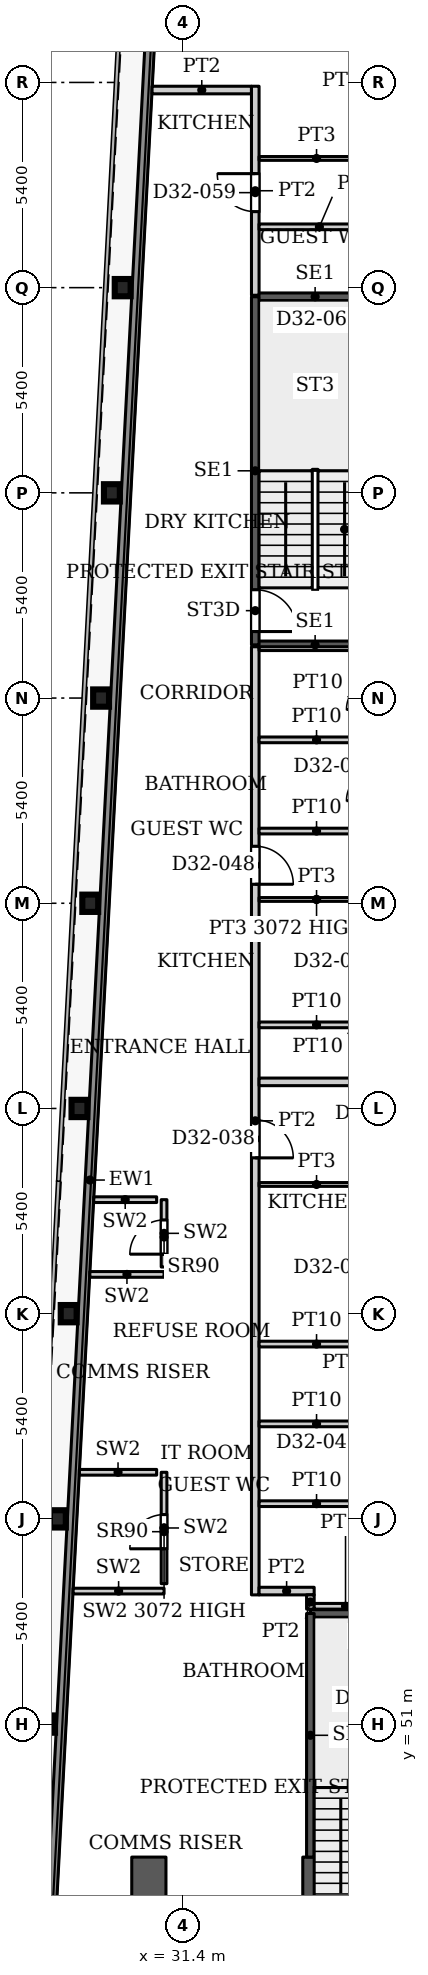
"""IFC4 building model, lengths in metres.
Left out: names, types, materials, properties, quantities, classifications, styles, units other than length and angle.
Written with IfcOpenShell. Run it as: python <this file> out.ifc"""

import sys

from ifc_helpers import new_model, si_unit, direction, frame, frame_2d, origin, origin_2d, place, context, subcontext, project, spatial, rectangle, i_section, extrude, source, transform, mapped, element, fill, save


model = new_model("IFC4")
c1 = context("Model", 3, precision=1e-05, world=origin(), true_north=direction((0.0, 1.0)))
c2 = subcontext(c1, "Body", "Model", "MODEL_VIEW")
j1 = project(units=[si_unit("LENGTHUNIT", "METRE"), si_unit("PLANEANGLEUNIT", "RADIAN")], contexts=[c1])
p1 = place(None, origin())
s1 = spatial("IfcSite", under=j1, at=p1, CompositionType="ELEMENT")
p2 = place(p1, origin())
s2 = spatial("IfcBuilding", under=s1, at=p2, CompositionType="ELEMENT")
p3 = place(p2, frame((0.0, 0.0, 137.0)))
s3 = spatial("IfcBuildingStorey", under=s2, at=p3, CompositionType="ELEMENT", Elevation=137.0)
for number, where, z_axis, x_axis in (
    (1, (27.822, 51.0, 0.0), (0.0, 0.0, 1.0), (1.0, 0.0, 0.0)),
    (2, (28.106, 56.4, 0.0), (0.0, 0.0, 1.0), (1.0, 0.0, 0.0)),
    (3, (28.39, 61.8, 0.0), (0.0, 0.0, 1.0), (1.0, 0.0, 0.0)),
    (4, (28.674, 67.2, 0.0), (0.0, 0.0, 1.0), (1.0, 0.0, 0.0)),
    (5, (28.958, 72.6, 0.0), (0.0, 0.0, 1.0), (1.0, 0.0, 0.0)),
    (6, (29.243, 78.0, 0.0), (0.0, 0.0, 1.0), (1.0, 0.0, 0.0)),
    (7, (29.527, 83.4, 0.0), (0.0, 0.0, 1.0), (1.0, 0.0, 0.0)),
    (8, (29.811, 88.8, 0.0), (0.0, 0.0, 1.0), (1.0, 0.0, 0.0)),
):
    element("IfcColumn", number, at=place(p3, frame(where, z_axis=z_axis, x_axis=x_axis)), inside=s3, PredefinedType="COLUMN", context=c2, shape_type="SweptSolid", body=[
        extrude(i_section(OverallWidth=0.418, OverallDepth=0.455, WebThickness=0.042, FlangeThickness=0.068, FilletRadius=0.014, at=origin_2d()), origin(), (0.0, 0.0, 1.0), 3.9),
    ])
p4 = place(p3, frame((34.75, 29.05, 0.0), z_axis=(0.0, 0.0, 1.0), x_axis=(0.0, 1.0, 0.0)))
e9 = element("IfcWall", 9, at=p4, inside=s3, PredefinedType="SHEAR", context=c2, shape_type="SweptSolid", body=[
    extrude(rectangle(XDim=18.45, YDim=0.4, at=frame_2d((9.225, 0.0))), origin(), (0.0, 0.0, 1.0), 3.9),
])
p5 = place(p4, frame((8.025, 0.0, 0.0)))
e10 = element("IfcOpeningElement", 10, at=p5, cuts=e9, PredefinedType="OPENING", context=c2, shape_type="SweptSolid", body=[
    extrude(rectangle(XDim=1.1, YDim=2.2, at=frame_2d((0.55, 1.1))), frame((0.0, 0.21, 0.0), z_axis=(0.0, -1.0, 0.0), x_axis=(1.0, 0.0, 0.0)), (0.0, 0.0, 1.0), 0.42),
])
p6 = place(p4, frame((10.875, 0.0, 0.0)))
e11 = element("IfcOpeningElement", 11, at=p6, cuts=e9, PredefinedType="OPENING", context=c2, shape_type="SweptSolid", body=[
    extrude(rectangle(XDim=1.1, YDim=2.2, at=frame_2d((0.55, 1.1))), frame((0.0, 0.21, 0.0), z_axis=(0.0, -1.0, 0.0), x_axis=(1.0, 0.0, 0.0)), (0.0, 0.0, 1.0), 0.42),
])
p7 = place(p4, frame((13.725, 0.0, 0.0)))
e12 = element("IfcOpeningElement", 12, at=p7, cuts=e9, PredefinedType="OPENING", context=c2, shape_type="SweptSolid", body=[
    extrude(rectangle(XDim=1.1, YDim=2.2, at=frame_2d((0.55, 1.1))), frame((0.0, 0.21, 0.0), z_axis=(0.0, -1.0, 0.0), x_axis=(1.0, 0.0, 0.0)), (0.0, 0.0, 1.0), 0.42),
])
p8 = place(p4, frame((15.95, 0.0, 0.0)))
e13 = element("IfcOpeningElement", 13, at=p8, cuts=e9, PredefinedType="OPENING", context=c2, shape_type="SweptSolid", body=[
    extrude(rectangle(XDim=1.1, YDim=2.2, at=frame_2d((0.55, 1.1))), frame((0.0, 0.21, 0.0), z_axis=(0.0, -1.0, 0.0), x_axis=(1.0, 0.0, 0.0)), (0.0, 0.0, 1.0), 0.42),
])
p9 = place(p3, frame((30.5, 29.05, 0.0), z_axis=(0.0, 0.0, 1.0), x_axis=(0.0, 1.0, 0.0)))
e14 = element("IfcWall", 14, at=p9, inside=s3, PredefinedType="SHEAR", context=c2, shape_type="SweptSolid", body=[
    extrude(rectangle(XDim=18.45, YDim=0.9, at=frame_2d((9.225, 0.0))), origin(), (0.0, 0.0, 1.0), 3.9),
])
p10 = place(p9, frame((1.5, 0.0, 0.0)))
e15 = element("IfcOpeningElement", 15, at=p10, cuts=e14, PredefinedType="OPENING", context=c2, shape_type="SweptSolid", body=[
    extrude(rectangle(XDim=0.9, YDim=2.2, at=frame_2d((0.45, 1.1))), frame((0.0, 0.46, 0.0), z_axis=(0.0, -1.0, 0.0), x_axis=(1.0, 0.0, 0.0)), (0.0, 0.0, 1.0), 0.92),
])
p11 = place(p9, frame((7.406, 0.0, 0.0)))
e16 = element("IfcOpeningElement", 16, at=p11, cuts=e14, PredefinedType="OPENING", context=c2, shape_type="SweptSolid", body=[
    extrude(rectangle(XDim=0.9, YDim=2.2, at=frame_2d((0.45, 1.1))), frame((0.0, 0.46, 0.0), z_axis=(0.0, -1.0, 0.0), x_axis=(1.0, 0.0, 0.0)), (0.0, 0.0, 1.0), 0.92),
])
p12 = place(p9, frame((11.688, 0.0, 0.0)))
e17 = element("IfcOpeningElement", 17, at=p12, cuts=e14, PredefinedType="OPENING", context=c2, shape_type="SweptSolid", body=[
    extrude(rectangle(XDim=0.9, YDim=2.2, at=frame_2d((0.45, 1.1))), frame((0.0, 0.46, 0.0), z_axis=(0.0, -1.0, 0.0), x_axis=(1.0, 0.0, 0.0)), (0.0, 0.0, 1.0), 0.92),
])
p13 = place(p3, frame((27.195, 31.969, 0.0), z_axis=(0.0, 0.0, 1.0), x_axis=(0.052554995867, 0.998618031286, 0.0)))
e18 = element("IfcWall", 18, at=p13, inside=s3, PredefinedType="SOLIDWALL", context=c2, shape_type="SweptSolid", body=[
    extrude(rectangle(XDim=66.787, YDim=0.25, at=frame_2d((33.394, 0.0))), origin(), (0.0, 0.0, 1.0), 3.75),
])
p14 = place(p3, frame((34.75, 53.91, 0.0), z_axis=(0.0, 0.0, 1.0), x_axis=(1.0, 0.0, 0.0)))
e19 = element("IfcWall", 19, at=p14, inside=s3, PredefinedType="SHEAR", context=c2, shape_type="SweptSolid", body=[
    extrude(rectangle(XDim=3.15, YDim=0.2, at=frame_2d((1.575, 0.0))), origin(), (0.0, 0.0, 1.0), 3.9),
])
p15 = place(p3, frame((34.75, 47.5, 0.0), z_axis=(0.0, 0.0, 1.0), x_axis=(0.0, 1.0, 0.0)))
e20 = element("IfcWall", 20, at=p15, inside=s3, PredefinedType="SHEAR", context=c2, shape_type="SweptSolid", body=[
    extrude(rectangle(XDim=6.41, YDim=0.2, at=frame_2d((3.205, 0.0))), origin(), (0.0, 0.0, 1.0), 3.9),
])
for number, where, z_axis, x_axis in (
    (21, (33.3, 79.4, 0.0), (0.0, 0.0, 1.0), (1.0, 0.0, 0.0)),
    (22, (33.3, 88.56, 0.0), (0.0, 0.0, 1.0), (1.0, 0.0, 0.0)),
):
    element("IfcWall", number, at=place(p3, frame(where, z_axis=z_axis, x_axis=x_axis)), inside=s3, PredefinedType="SHEAR", context=c2, shape_type="SweptSolid", body=[
        extrude(rectangle(XDim=3.15, YDim=0.2, at=frame_2d((1.575, 0.0))), origin(), (0.0, 0.0, 1.0), 3.9),
    ])
p16 = place(p3, frame((33.3, 79.4, 0.0), z_axis=(0.0, 0.0, 1.0), x_axis=(0.0, 1.0, 0.0)))
e23 = element("IfcWall", 23, at=p16, inside=s3, PredefinedType="SHEAR", context=c2, shape_type="SweptSolid", body=[
    extrude(rectangle(XDim=9.16, YDim=0.2, at=frame_2d((4.58, 0.0))), origin(), (0.0, 0.0, 1.0), 3.9),
])
p17 = place(p16, frame((0.35, 0.0, 0.0)))
e24 = element("IfcOpeningElement", 24, at=p17, cuts=e23, PredefinedType="OPENING", context=c2, shape_type="SweptSolid", body=[
    extrude(rectangle(XDim=1.1, YDim=2.2, at=frame_2d((0.55, 1.1))), frame((0.0, 0.11, 0.0), z_axis=(0.0, -1.0, 0.0), x_axis=(1.0, 0.0, 0.0)), (0.0, 0.0, 1.0), 0.22),
])
p18 = place(p3, frame((28.508, 54.5, 0.0), z_axis=(0.0, 0.0, 1.0), x_axis=(1.0, 0.0, 0.0)))
e25 = element("IfcWall", 25, at=p18, inside=s3, PredefinedType="PARTITIONING", context=c2, shape_type="SweptSolid", body=[
    extrude(rectangle(XDim=2.392, YDim=0.15, at=frame_2d((1.196, 0.0))), origin(), (0.0, 0.0, 1.0), 3.9),
])
p19 = place(p3, frame((30.9, 54.695, 0.0), z_axis=(0.0, 0.0, 1.0), x_axis=(0.0, 1.0, 0.0)))
e26 = element("IfcWall", 26, at=p19, inside=s3, PredefinedType="PARTITIONING", context=c2, shape_type="SweptSolid", body=[
    extrude(rectangle(XDim=2.931, YDim=0.15, at=frame_2d((1.465, 0.0))), origin(), (0.0, 0.0, 1.0), 3.072),
])
p20 = place(p19, frame((0.918, 0.0, 0.0)))
e27 = element("IfcOpeningElement", 27, at=p20, cuts=e26, PredefinedType="OPENING", context=c2, shape_type="SweptSolid", body=[
    extrude(rectangle(XDim=0.9, YDim=2.2, at=frame_2d((0.45, 1.1))), frame((0.0, 0.085, 0.0), z_axis=(0.0, -1.0, 0.0), x_axis=(1.0, 0.0, 0.0)), (0.0, 0.0, 1.0), 0.17),
])
p21 = place(p3, frame((28.673, 57.626, 0.0), z_axis=(0.0, 0.0, 1.0), x_axis=(1.0, 0.0, 0.0)))
e28 = element("IfcWall", 28, at=p21, inside=s3, PredefinedType="PARTITIONING", context=c2, shape_type="SweptSolid", body=[
    extrude(rectangle(XDim=2.032, YDim=0.15, at=frame_2d((1.016, 0.0))), origin(), (0.0, 0.0, 1.0), 3.9),
])
p22 = place(p3, frame((28.947, 62.833, 0.0), z_axis=(0.0, 0.0, 1.0), x_axis=(1.0, 0.0, 0.0)))
e29 = element("IfcWall", 29, at=p22, inside=s3, PredefinedType="PARTITIONING", context=c2, shape_type="SweptSolid", body=[
    extrude(rectangle(XDim=1.953, YDim=0.15, at=frame_2d((0.977, 0.0))), origin(), (0.0, 0.0, 1.0), 3.9),
])
p23 = place(p3, frame((30.9, 63.028, 0.0), z_axis=(0.0, 0.0, 1.0), x_axis=(0.0, 1.0, 0.0)))
e30 = element("IfcWall", 30, at=p23, inside=s3, PredefinedType="PARTITIONING", context=c2, shape_type="SweptSolid", body=[
    extrude(rectangle(XDim=1.772, YDim=0.15, at=frame_2d((0.886, 0.0))), origin(), (0.0, 0.0, 1.0), 3.9),
])
p24 = place(p23, frame((0.338, 0.0, 0.0)))
e31 = element("IfcOpeningElement", 31, at=p24, cuts=e30, PredefinedType="OPENING", context=c2, shape_type="SweptSolid", body=[
    extrude(rectangle(XDim=0.9, YDim=2.2, at=frame_2d((0.45, 1.1))), frame((0.0, 0.085, 0.0), z_axis=(0.0, -1.0, 0.0), x_axis=(1.0, 0.0, 0.0)), (0.0, 0.0, 1.0), 0.17),
])
p25 = place(p3, frame((29.05, 64.8, 0.0), z_axis=(0.0, 0.0, 1.0), x_axis=(1.0, 0.0, 0.0)))
e32 = element("IfcWall", 32, at=p25, inside=s3, PredefinedType="PARTITIONING", context=c2, shape_type="SweptSolid", body=[
    extrude(rectangle(XDim=1.655, YDim=0.15, at=frame_2d((0.828, 0.0))), origin(), (0.0, 0.0, 1.0), 3.9),
])
p26 = place(p3, frame((30.585, 94.0, 0.0), z_axis=(0.0, 0.0, 1.0), x_axis=(1.0, 0.0, 0.0)))
e33 = element("IfcWall", 33, at=p26, inside=s3, PredefinedType="PARTITIONING", context=c2, shape_type="SweptSolid", body=[
    extrude(rectangle(XDim=2.615, YDim=0.2, at=frame_2d((1.308, 0.0))), origin(), (0.0, 0.0, 1.0), 3.6),
])
p27 = place(p3, frame((33.3, 54.4, 0.0), z_axis=(0.0, 0.0, 1.0), x_axis=(0.0, 1.0, 0.0)))
e34 = element("IfcWall", 34, at=p27, inside=s3, PredefinedType="PARTITIONING", context=c2, shape_type="SweptSolid", body=[
    extrude(rectangle(XDim=24.95, YDim=0.2, at=frame_2d((12.475, 0.0))), origin(), (0.0, 0.0, 1.0), 3.6),
])
p28 = place(p27, frame((11.5, 0.0, 0.0)))
e35 = element("IfcOpeningElement", 35, at=p28, cuts=e34, PredefinedType="OPENING", context=c2, shape_type="SweptSolid", body=[
    extrude(rectangle(XDim=1.0, YDim=2.1, at=frame_2d((0.5, 1.05))), frame((0.0, 0.11, 0.0), z_axis=(0.0, -1.0, 0.0), x_axis=(1.0, 0.0, 0.0)), (0.0, 0.0, 1.0), 0.22),
])
p29 = place(p27, frame((18.7, 0.0, 0.0)))
e36 = element("IfcOpeningElement", 36, at=p29, cuts=e34, PredefinedType="OPENING", context=c2, shape_type="SweptSolid", body=[
    extrude(rectangle(XDim=1.0, YDim=2.1, at=frame_2d((0.5, 1.05))), frame((0.0, 0.11, 0.0), z_axis=(0.0, -1.0, 0.0), x_axis=(1.0, 0.0, 0.0)), (0.0, 0.0, 1.0), 0.22),
])
p30 = place(p3, frame((33.3, 88.6, 0.0), z_axis=(0.0, 0.0, 1.0), x_axis=(0.0, 1.0, 0.0)))
e37 = element("IfcWall", 37, at=p30, inside=s3, PredefinedType="PARTITIONING", context=c2, shape_type="SweptSolid", body=[
    extrude(rectangle(XDim=5.5, YDim=0.2, at=frame_2d((2.75, 0.0))), origin(), (0.0, 0.0, 1.0), 3.6),
])
p31 = place(p30, frame((2.2, 0.0, 0.0)))
e38 = element("IfcOpeningElement", 38, at=p31, cuts=e37, PredefinedType="OPENING", context=c2, shape_type="SweptSolid", body=[
    extrude(rectangle(XDim=1.0, YDim=2.1, at=frame_2d((0.5, 1.05))), frame((0.0, 0.11, 0.0), z_axis=(0.0, -1.0, 0.0), x_axis=(1.0, 0.0, 0.0)), (0.0, 0.0, 1.0), 0.22),
])
p32 = place(p3, frame((33.4, 54.5, 0.0), z_axis=(0.0, 0.0, 1.0), x_axis=(1.0, 0.0, 0.0)))
e39 = element("IfcWall", 39, at=p32, inside=s3, PredefinedType="PARTITIONING", context=c2, shape_type="SweptSolid", body=[
    extrude(rectangle(XDim=1.45, YDim=0.2, at=frame_2d((0.725, 0.0))), origin(), (0.0, 0.0, 1.0), 3.6),
])
for number, where, z_axis, x_axis in (
    (40, (33.4, 56.8, 0.0), (0.0, 0.0, 1.0), (1.0, 0.0, 0.0)),
    (41, (33.4, 58.9, 0.0), (0.0, 0.0, 1.0), (1.0, 0.0, 0.0)),
    (42, (33.4, 61.0, 0.0), (0.0, 0.0, 1.0), (1.0, 0.0, 0.0)),
):
    element("IfcWall", number, at=place(p3, frame(where, z_axis=z_axis, x_axis=x_axis)), inside=s3, PredefinedType="PARTITIONING", context=c2, shape_type="SweptSolid", body=[
        extrude(rectangle(XDim=3.025, YDim=0.15, at=frame_2d((1.513, 0.0))), origin(), (0.0, 0.0, 1.0), 3.6),
    ])
p33 = place(p3, frame((33.4, 65.2, 0.0), z_axis=(0.0, 0.0, 1.0), x_axis=(1.0, 0.0, 0.0)))
e43 = element("IfcWall", 43, at=p33, inside=s3, PredefinedType="PARTITIONING", context=c2, shape_type="SweptSolid", body=[
    extrude(rectangle(XDim=3.025, YDim=0.1, at=frame_2d((1.513, 0.0))), origin(), (0.0, 0.0, 1.0), 3.6),
])
p34 = place(p3, frame((33.4, 67.9, 0.0), z_axis=(0.0, 0.0, 1.0), x_axis=(1.0, 0.0, 0.0)))
e44 = element("IfcWall", 44, at=p34, inside=s3, PredefinedType="PARTITIONING", context=c2, shape_type="SweptSolid", body=[
    extrude(rectangle(XDim=12.5, YDim=0.2, at=frame_2d((6.25, 0.0))), origin(), (0.0, 0.0, 1.0), 3.6),
])
p35 = place(p3, frame((33.4, 69.4, 0.0), z_axis=(0.0, 0.0, 1.0), x_axis=(1.0, 0.0, 0.0)))
e45 = element("IfcWall", 45, at=p35, inside=s3, PredefinedType="PARTITIONING", context=c2, shape_type="SweptSolid", body=[
    extrude(rectangle(XDim=3.025, YDim=0.15, at=frame_2d((1.513, 0.0))), origin(), (0.0, 0.0, 1.0), 3.6),
])
p36 = place(p3, frame((33.4, 72.7, 0.0), z_axis=(0.0, 0.0, 1.0), x_axis=(1.0, 0.0, 0.0)))
e46 = element("IfcWall", 46, at=p36, inside=s3, PredefinedType="PARTITIONING", context=c2, shape_type="SweptSolid", body=[
    extrude(rectangle(XDim=3.025, YDim=0.1, at=frame_2d((1.513, 0.0))), origin(), (0.0, 0.0, 1.0), 3.072),
])
for number, where, z_axis, x_axis in (
    (47, (33.4, 74.5, 0.0), (0.0, 0.0, 1.0), (1.0, 0.0, 0.0)),
    (48, (33.4, 76.9, 0.0), (0.0, 0.0, 1.0), (1.0, 0.0, 0.0)),
):
    element("IfcWall", number, at=place(p3, frame(where, z_axis=z_axis, x_axis=x_axis)), inside=s3, PredefinedType="PARTITIONING", context=c2, shape_type="SweptSolid", body=[
        extrude(rectangle(XDim=3.025, YDim=0.15, at=frame_2d((1.513, 0.0))), origin(), (0.0, 0.0, 1.0), 3.6),
    ])
p37 = place(p3, frame((33.4, 79.3, 0.0), z_axis=(0.0, 0.0, 1.0), x_axis=(1.0, 0.0, 0.0)))
e49 = element("IfcWall", 49, at=p37, inside=s3, PredefinedType="PARTITIONING", context=c2, shape_type="SweptSolid", body=[
    extrude(rectangle(XDim=12.5, YDim=0.1, at=frame_2d((6.25, 0.0))), origin(), (0.0, 0.0, 1.0), 3.6),
])
p38 = place(p37, frame((3.355, 0.0, 0.0)))
e50 = element("IfcOpeningElement", 50, at=p38, cuts=e49, PredefinedType="OPENING", context=c2, shape_type="SweptSolid", body=[
    extrude(rectangle(XDim=0.9, YDim=2.1, at=frame_2d((0.45, 1.05))), frame((0.0, 0.06, 0.0), z_axis=(0.0, -1.0, 0.0), x_axis=(1.0, 0.0, 0.0)), (0.0, 0.0, 1.0), 0.12),
])
p39 = place(p3, frame((33.4, 90.4, 0.0), z_axis=(0.0, 0.0, 1.0), x_axis=(1.0, 0.0, 0.0)))
e51 = element("IfcWall", 51, at=p39, inside=s3, PredefinedType="PARTITIONING", context=c2, shape_type="SweptSolid", body=[
    extrude(rectangle(XDim=3.175, YDim=0.15, at=frame_2d((1.587, 0.0))), origin(), (0.0, 0.0, 1.0), 3.6),
])
p40 = place(p3, frame((33.4, 92.2, 0.0), z_axis=(0.0, 0.0, 1.0), x_axis=(1.0, 0.0, 0.0)))
e52 = element("IfcWall", 52, at=p40, inside=s3, PredefinedType="PARTITIONING", context=c2, shape_type="SweptSolid", body=[
    extrude(rectangle(XDim=3.025, YDim=0.1, at=frame_2d((1.513, 0.0))), origin(), (0.0, 0.0, 1.0), 3.6),
])
p41 = place(p3, frame((34.75, 54.025, 0.0), z_axis=(0.0, 0.0, 1.0), x_axis=(0.0, 1.0, 0.0)))
e53 = element("IfcWall", 53, at=p41, inside=s3, PredefinedType="PARTITIONING", context=c2, shape_type="SweptSolid", body=[
    extrude(rectangle(XDim=0.375, YDim=0.2, at=frame_2d((0.188, 0.0))), origin(), (0.0, 0.0, 1.0), 3.6),
])
p42 = place(p3, frame((34.85, 54.1, 0.0), z_axis=(0.0, 0.0, 1.0), x_axis=(1.0, 0.0, 0.0)))
e54 = element("IfcWall", 54, at=p42, inside=s3, PredefinedType="PARTITIONING", context=c2, shape_type="SweptSolid", body=[
    extrude(rectangle(XDim=1.65, YDim=0.15, at=frame_2d((0.825, 0.0))), origin(), (0.0, 0.0, 1.0), 3.6),
])
m1 = source(origin(), c2, "Body", "SweptSolid", [
    extrude(rectangle(XDim=0.9, YDim=2.2, at=frame_2d((0.45, 1.1))), frame((0.0, 0.025, 0.0), z_axis=(0.0, -1.0, 0.0), x_axis=(1.0, 0.0, 0.0)), (0.0, 0.0, 1.0), 0.05),
])
p43 = place(p20, origin())
e55 = element("IfcDoor", 55, at=p43, inside=s3, OperationType="SINGLE_SWING_LEFT", PredefinedType="DOOR", context=c2, shape_type="MappedRepresentation", body=[
    mapped(m1, transform((0.0, 0.0, 0.0), x_axis=(1.0, 0.0, 0.0), y_axis=(0.0, 1.0, 0.0), z_axis=(0.0, 0.0, 1.0), scale=1.0)),
])
fill(e27, e55)
p44 = place(p24, origin())
e56 = element("IfcDoor", 56, at=p44, inside=s3, OperationType="SINGLE_SWING_LEFT", PredefinedType="DOOR", context=c2, shape_type="MappedRepresentation", body=[
    mapped(m1, transform((0.0, 0.0, 0.0), x_axis=(1.0, 0.0, 0.0), y_axis=(0.0, 1.0, 0.0), z_axis=(0.0, 0.0, 1.0), scale=1.0)),
])
fill(e31, e56)
m2 = source(origin(), c2, "Body", "SweptSolid", [
    extrude(rectangle(XDim=1.1, YDim=2.2, at=frame_2d((0.55, 1.1))), frame((0.0, 0.025, 0.0), z_axis=(0.0, -1.0, 0.0), x_axis=(1.0, 0.0, 0.0)), (0.0, 0.0, 1.0), 0.05),
])
p45 = place(p17, origin())
e57 = element("IfcDoor", 57, at=p45, inside=s3, OperationType="SINGLE_SWING_RIGHT", PredefinedType="DOOR", context=c2, shape_type="MappedRepresentation", body=[
    mapped(m2, transform((0.0, 0.0, 0.0), x_axis=(1.0, 0.0, 0.0), y_axis=(0.0, 1.0, 0.0), z_axis=(0.0, 0.0, 1.0), scale=1.0)),
])
fill(e24, e57)
m3 = source(origin(), c2, "Body", "SweptSolid", [
    extrude(rectangle(XDim=1.0, YDim=2.1, at=frame_2d((0.5, 1.05))), frame((0.0, 0.025, 0.0), z_axis=(0.0, -1.0, 0.0), x_axis=(1.0, 0.0, 0.0)), (0.0, 0.0, 1.0), 0.05),
])
p46 = place(p28, origin())
e58 = element("IfcDoor", 58, at=p46, inside=s3, OperationType="SINGLE_SWING_RIGHT", PredefinedType="DOOR", context=c2, shape_type="MappedRepresentation", body=[
    mapped(m3, transform((0.0, 0.0, 0.0), x_axis=(1.0, 0.0, 0.0), y_axis=(0.0, 1.0, 0.0), z_axis=(0.0, 0.0, 1.0), scale=1.0)),
])
fill(e35, e58)
p47 = place(p29, origin())
e59 = element("IfcDoor", 59, at=p47, inside=s3, OperationType="SINGLE_SWING_RIGHT", PredefinedType="DOOR", context=c2, shape_type="MappedRepresentation", body=[
    mapped(m3, transform((0.0, 0.0, 0.0), x_axis=(1.0, 0.0, 0.0), y_axis=(0.0, 1.0, 0.0), z_axis=(0.0, 0.0, 1.0), scale=1.0)),
])
fill(e36, e59)
p48 = place(p31, origin())
e60 = element("IfcDoor", 60, at=p48, inside=s3, OperationType="SINGLE_SWING_LEFT", PredefinedType="DOOR", context=c2, shape_type="MappedRepresentation", body=[
    mapped(m3, transform((0.0, 0.0, 0.0), x_axis=(1.0, 0.0, 0.0), y_axis=(0.0, 1.0, 0.0), z_axis=(0.0, 0.0, 1.0), scale=1.0)),
])
fill(e38, e60)
save(model, sys.argv[1])
